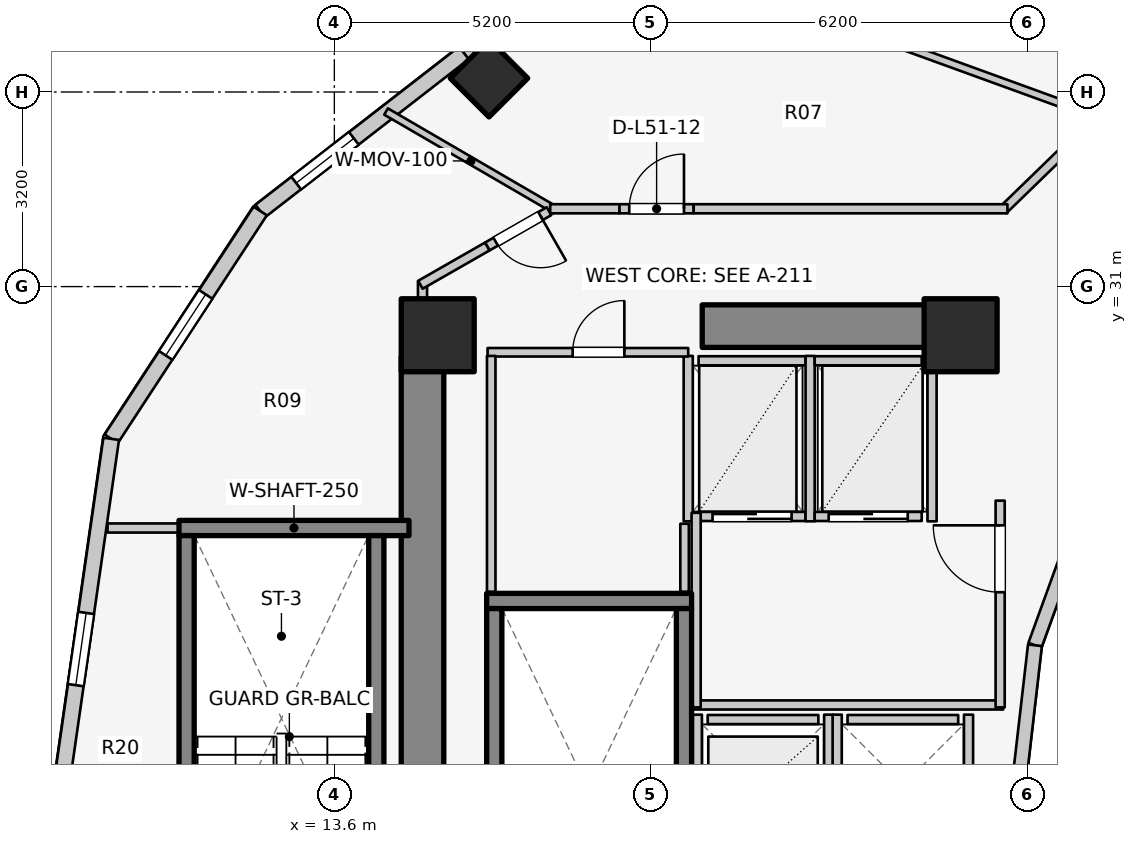
"""IFC4 building model, lengths in metres.
Left out: names, types, materials, properties, quantities, classifications, styles, units other than length and angle.
Written with IfcOpenShell. Run it as: python <this file> out.ifc"""

import sys

from ifc_helpers import new_model, si_unit, direction, frame, frame_2d, origin, origin_2d, place, context, subcontext, project, spatial, rectangle, extrude, element, fill, save


model = new_model("IFC4")
c1 = context("Model", 3, precision=1e-05, world=origin(), true_north=direction((0.0, 1.0)))
c2 = subcontext(c1, "Body", "Model", "MODEL_VIEW")
j1 = project(units=[si_unit("LENGTHUNIT", "METRE"), si_unit("PLANEANGLEUNIT", "RADIAN")], contexts=[c1])
p1 = place(None, origin())
s1 = spatial("IfcSite", under=j1, at=p1, CompositionType="ELEMENT")
p2 = place(p1, origin())
s2 = spatial("IfcBuilding", under=s1, at=p2, CompositionType="ELEMENT")
p3 = place(p2, frame((0.0, 0.0, 168.4)))
s3 = spatial("IfcBuildingStorey", under=s2, at=p3, CompositionType="ELEMENT", Elevation=168.4)
p4 = place(p3, frame((15.05, 17.05, 0.0), z_axis=(0.0, 0.0, 1.0), x_axis=(0.0, 1.0, 0.0)))
e1 = element("IfcWall", 1, at=p4, inside=s3, PredefinedType="SHEAR", context=c2, shape_type="SweptSolid", body=[
    extrude(rectangle(XDim=12.8, YDim=0.7, at=frame_2d((6.4, 0.0))), origin(), (0.0, 0.0, 1.0), 3.1),
])
p5 = place(p3, frame((19.65, 30.35, 0.0), z_axis=(0.0, 0.0, 1.0), x_axis=(1.0, 0.0, 0.0)))
e2 = element("IfcWall", 2, at=p5, inside=s3, PredefinedType="SHEAR", context=c2, shape_type="SweptSolid", body=[
    extrude(rectangle(XDim=4.5, YDim=0.7, at=frame_2d((2.25, 0.0))), origin(), (0.0, 0.0, 1.0), 3.1),
])
p6 = place(p3, frame((16.105, 25.83, 0.0), z_axis=(0.0, 0.0, 1.0), x_axis=(1.0, 0.0, 0.0)))
e3 = element("IfcWall", 3, at=p6, inside=s3, PredefinedType="SOLIDWALL", context=c2, shape_type="SweptSolid", body=[
    extrude(rectangle(XDim=3.37, YDim=0.25, at=frame_2d((1.685, 0.0))), origin(), (0.0, 0.0, 1.0), 3.1),
])
for number, where, z_axis, x_axis in (
    (4, (16.23, 17.895, 0.0), (0.0, 0.0, 1.0), (0.0, 1.0, 0.0)),
    (5, (19.35, 17.895, 0.0), (0.0, 0.0, 1.0), (0.0, 1.0, 0.0)),
):
    element("IfcWall", number, at=place(p3, frame(where, z_axis=z_axis, x_axis=x_axis)), inside=s3, PredefinedType="SOLIDWALL", context=c2, shape_type="SweptSolid", body=[
        extrude(rectangle(XDim=7.81, YDim=0.25, at=frame_2d((3.905, 0.0))), origin(), (0.0, 0.0, 1.0), 3.1),
    ])
p7 = place(p3, frame((11.045, 27.03, 0.0), z_axis=(0.0, 0.0, 1.0), x_axis=(1.0, 0.0, 0.0)))
e6 = element("IfcWall", 6, at=p7, inside=s3, PredefinedType="SOLIDWALL", context=c2, shape_type="SweptSolid", body=[
    extrude(rectangle(XDim=3.782, YDim=0.25, at=frame_2d((1.891, 0.0))), origin(), (0.0, 0.0, 1.0), 3.1),
])
for number, where, z_axis, x_axis in (
    (7, (11.17, 19.095, 0.0), (0.0, 0.0, 1.0), (0.0, 1.0, 0.0)),
    (8, (14.29, 19.095, 0.0), (0.0, 0.0, 1.0), (0.0, 1.0, 0.0)),
):
    element("IfcWall", number, at=place(p3, frame(where, z_axis=z_axis, x_axis=x_axis)), inside=s3, PredefinedType="SOLIDWALL", context=c2, shape_type="SweptSolid", body=[
        extrude(rectangle(XDim=7.81, YDim=0.25, at=frame_2d((3.905, 0.0))), origin(), (0.0, 0.0, 1.0), 3.1),
    ])
for number, where, z_axis, x_axis in (
    (9, (23.9, 30.2, 0.0), (0.0, 0.0, 1.0), (1.0, 0.0, 0.0)),
    (10, (15.3, 30.2, 0.0), (0.0, 0.0, 1.0), (1.0, 0.0, 0.0)),
):
    element("IfcColumn", number, at=place(p3, frame(where, z_axis=z_axis, x_axis=x_axis)), inside=s3, PredefinedType="COLUMN", context=c2, shape_type="SweptSolid", body=[
        extrude(rectangle(XDim=1.2, YDim=1.2, at=origin_2d()), origin(), (0.0, 0.0, 1.0), 3.1),
    ])
p8 = place(p3, frame((16.143, 34.427, 0.0), z_axis=(0.0, 0.0, 1.0), x_axis=(-0.707106781187, 0.707106781187, 0.0)))
e11 = element("IfcColumn", 11, at=p8, inside=s3, PredefinedType="COLUMN", context=c2, shape_type="SweptSolid", body=[
    extrude(rectangle(XDim=0.9, YDim=0.9, at=origin_2d()), origin(), (0.0, 0.0, 1.0), 3.1),
])
p9 = place(p3, frame((25.834, 27.06, 0.0), z_axis=(0.0, 0.0, 1.0), x_axis=(-0.341423187295, -0.93990968033, 0.0)))
e12 = element("IfcWall", 12, at=p9, inside=s3, PredefinedType="STANDARD", context=c2, shape_type="SweptSolid", body=[
    extrude(rectangle(XDim=2.084, YDim=0.23, at=frame_2d((1.042, 0.0))), origin(), (0.0, 0.0, 1.0), 2.56),
])
p10 = place(p3, frame((25.123, 25.102, 0.0), z_axis=(0.0, 0.0, 1.0), x_axis=(-0.114711713601, -0.993398823617, 0.0)))
e13 = element("IfcWall", 13, at=p10, inside=s3, PredefinedType="STANDARD", context=c2, shape_type="SweptSolid", body=[
    extrude(rectangle(XDim=2.115, YDim=0.23, at=frame_2d((1.058, 0.0))), origin(), (0.0, 0.0, 1.0), 2.56),
])
p11 = place(p3, frame((19.587, 36.863, 0.0), z_axis=(0.0, 0.0, 1.0), x_axis=(-0.885660265226, -0.464333818065, 0.0)))
e14 = element("IfcWall", 14, at=p11, inside=s3, PredefinedType="STANDARD", context=c2, shape_type="SweptSolid", body=[
    extrude(rectangle(XDim=4.354, YDim=0.26, at=frame_2d((2.177, 0.0))), origin(), (0.0, 0.0, 1.0), 1.22),
])
p12 = place(p3, frame((15.731, 34.842, 0.0), z_axis=(0.0, 0.0, 1.0), x_axis=(-0.790185650662, -0.612867552973, 0.0)))
e15 = element("IfcWall", 15, at=p12, inside=s3, PredefinedType="STANDARD", context=c2, shape_type="SweptSolid", body=[
    extrude(rectangle(XDim=4.239, YDim=0.26, at=frame_2d((2.12, 0.0))), origin(), (0.0, 0.0, 1.0), 1.22),
])
p13 = place(p12, frame((2.29, 0.0, 0.15)))
e16 = element("IfcOpeningElement", 16, at=p13, cuts=e15, PredefinedType="OPENING", context=c2, shape_type="SweptSolid", body=[
    extrude(rectangle(XDim=1.2, YDim=0.9, at=frame_2d((0.6, 0.45))), frame((0.0, 0.14, 0.0), z_axis=(0.0, -1.0, 0.0), x_axis=(1.0, 0.0, 0.0)), (0.0, 0.0, 1.0), 0.28),
])
p14 = place(p3, frame((12.381, 32.243, 0.0), z_axis=(0.0, 0.0, 1.0), x_axis=(-0.547456494366, -0.836834145322, 0.0)))
e17 = element("IfcWall", 17, at=p14, inside=s3, PredefinedType="STANDARD", context=c2, shape_type="SweptSolid", body=[
    extrude(rectangle(XDim=4.477, YDim=0.26, at=frame_2d((2.239, 0.0))), origin(), (0.0, 0.0, 1.0), 1.22),
])
p15 = place(p14, frame((1.639, 0.0, 0.15)))
e18 = element("IfcOpeningElement", 18, at=p15, cuts=e17, PredefinedType="OPENING", context=c2, shape_type="SweptSolid", body=[
    extrude(rectangle(XDim=1.2, YDim=0.9, at=frame_2d((0.6, 0.45))), frame((0.0, 0.14, 0.0), z_axis=(0.0, -1.0, 0.0), x_axis=(1.0, 0.0, 0.0)), (0.0, 0.0, 1.0), 0.28),
])
p16 = place(p3, frame((9.93, 28.497, 0.0), z_axis=(0.0, 0.0, 1.0), x_axis=(-0.142227632286, -0.989833976288, 0.0)))
e19 = element("IfcWall", 19, at=p16, inside=s3, PredefinedType="STANDARD", context=c2, shape_type="SweptSolid", body=[
    extrude(rectangle(XDim=5.553, YDim=0.26, at=frame_2d((2.776, 0.0))), origin(), (0.0, 0.0, 1.0), 2.57),
])
p17 = place(p16, frame((2.892, 0.0, 0.75)))
e20 = element("IfcOpeningElement", 20, at=p17, cuts=e19, PredefinedType="OPENING", context=c2, shape_type="SweptSolid", body=[
    extrude(rectangle(XDim=1.2, YDim=1.5, at=frame_2d((0.6, 0.75))), frame((0.0, 0.14, 0.0), z_axis=(0.0, -1.0, 0.0), x_axis=(1.0, 0.0, 0.0)), (0.0, 0.0, 1.0), 0.28),
])
p18 = place(p3, frame((19.74, 23.88, 0.0), z_axis=(0.0, 0.0, 1.0), x_axis=(1.0, 0.0, 0.0)))
e21 = element("IfcWall", 21, at=p18, inside=s3, PredefinedType="SOLIDWALL", context=c2, shape_type="SweptSolid", body=[
    extrude(rectangle(XDim=1.82, YDim=0.15, at=frame_2d((0.91, 0.0))), origin(), (0.0, 0.0, 1.0), 2.575),
])
for number, where, z_axis, x_axis in (
    (22, (19.57, 21.64, 0.0), (0.0, 0.0, 1.0), (0.0, 1.0, 0.0)),
    (23, (21.73, 21.64, 0.0), (0.0, 0.0, 1.0), (0.0, 1.0, 0.0)),
):
    element("IfcWall", number, at=place(p3, frame(where, z_axis=z_axis, x_axis=x_axis)), inside=s3, PredefinedType="SOLIDWALL", context=c2, shape_type="SweptSolid", body=[
        extrude(rectangle(XDim=2.32, YDim=0.15, at=frame_2d((1.16, 0.0))), origin(), (0.0, 0.0, 1.0), 2.575),
    ])
p19 = place(p3, frame((22.04, 23.88, 0.0), z_axis=(0.0, 0.0, 1.0), x_axis=(1.0, 0.0, 0.0)))
e24 = element("IfcWall", 24, at=p19, inside=s3, PredefinedType="SOLIDWALL", context=c2, shape_type="SweptSolid", body=[
    extrude(rectangle(XDim=1.82, YDim=0.15, at=frame_2d((0.91, 0.0))), origin(), (0.0, 0.0, 1.0), 2.12),
])
p20 = place(p3, frame((21.87, 21.64, 0.0), z_axis=(0.0, 0.0, 1.0), x_axis=(0.0, 1.0, 0.0)))
e25 = element("IfcWall", 25, at=p20, inside=s3, PredefinedType="SOLIDWALL", context=c2, shape_type="SweptSolid", body=[
    extrude(rectangle(XDim=2.32, YDim=0.15, at=frame_2d((1.16, 0.0))), origin(), (0.0, 0.0, 1.0), 2.575),
])
p21 = place(p3, frame((24.03, 21.64, 0.0), z_axis=(0.0, 0.0, 1.0), x_axis=(0.0, 1.0, 0.0)))
e26 = element("IfcWall", 26, at=p21, inside=s3, PredefinedType="SOLIDWALL", context=c2, shape_type="SweptSolid", body=[
    extrude(rectangle(XDim=2.32, YDim=0.15, at=frame_2d((1.16, 0.0))), origin(), (0.0, 0.0, 1.0), 2.12),
])
p22 = place(p3, frame((19.59, 27.22, 0.0), z_axis=(0.0, 0.0, 1.0), x_axis=(1.0, 0.0, 0.0)))
e27 = element("IfcWall", 27, at=p22, inside=s3, PredefinedType="SOLIDWALL", context=c2, shape_type="SweptSolid", body=[
    extrude(rectangle(XDim=1.76, YDim=0.15, at=frame_2d((0.88, 0.0))), origin(), (0.0, 0.0, 1.0), 2.575),
])
p23 = place(p22, frame((0.23, 0.0, 0.0)))
e28 = element("IfcOpeningElement", 28, at=p23, cuts=e27, PredefinedType="OPENING", context=c2, shape_type="SweptSolid", body=[
    extrude(rectangle(XDim=1.3, YDim=2.1, at=frame_2d((0.65, 1.05))), frame((0.0, 0.085, 0.0), z_axis=(0.0, -1.0, 0.0), x_axis=(1.0, 0.0, 0.0)), (0.0, 0.0, 1.0), 0.17),
])
p24 = place(p3, frame((19.59, 29.78, 0.0), z_axis=(0.0, 0.0, 1.0), x_axis=(1.0, 0.0, 0.0)))
e29 = element("IfcWall", 29, at=p24, inside=s3, PredefinedType="SOLIDWALL", context=c2, shape_type="SweptSolid", body=[
    extrude(rectangle(XDim=1.76, YDim=0.15, at=frame_2d((0.88, 0.0))), origin(), (0.0, 0.0, 1.0), 2.575),
])
for number, where, z_axis, x_axis in (
    (30, (19.42, 27.14, 0.0), (0.0, 0.0, 1.0), (0.0, 1.0, 0.0)),
    (31, (21.425, 27.14, 0.0), (0.0, 0.0, 1.0), (0.0, 1.0, 0.0)),
):
    element("IfcWall", number, at=place(p3, frame(where, z_axis=z_axis, x_axis=x_axis)), inside=s3, PredefinedType="SOLIDWALL", context=c2, shape_type="SweptSolid", body=[
        extrude(rectangle(XDim=2.72, YDim=0.15, at=frame_2d((1.36, 0.0))), origin(), (0.0, 0.0, 1.0), 2.575),
    ])
p25 = place(p3, frame((21.5, 27.22, 0.0), z_axis=(0.0, 0.0, 1.0), x_axis=(1.0, 0.0, 0.0)))
e32 = element("IfcWall", 32, at=p25, inside=s3, PredefinedType="SOLIDWALL", context=c2, shape_type="SweptSolid", body=[
    extrude(rectangle(XDim=1.76, YDim=0.15, at=frame_2d((0.88, 0.0))), origin(), (0.0, 0.0, 1.0), 2.575),
])
p26 = place(p25, frame((0.23, 0.0, 0.0)))
e33 = element("IfcOpeningElement", 33, at=p26, cuts=e32, PredefinedType="OPENING", context=c2, shape_type="SweptSolid", body=[
    extrude(rectangle(XDim=1.3, YDim=2.1, at=frame_2d((0.65, 1.05))), frame((0.0, 0.085, 0.0), z_axis=(0.0, -1.0, 0.0), x_axis=(1.0, 0.0, 0.0)), (0.0, 0.0, 1.0), 0.17),
])
p27 = place(p3, frame((21.5, 29.78, 0.0), z_axis=(0.0, 0.0, 1.0), x_axis=(1.0, 0.0, 0.0)))
e34 = element("IfcWall", 34, at=p27, inside=s3, PredefinedType="SOLIDWALL", context=c2, shape_type="SweptSolid", body=[
    extrude(rectangle(XDim=1.76, YDim=0.15, at=frame_2d((0.88, 0.0))), origin(), (0.0, 0.0, 1.0), 2.575),
])
p28 = place(p3, frame((23.43, 27.14, 0.0), z_axis=(0.0, 0.0, 1.0), x_axis=(0.0, 1.0, 0.0)))
e35 = element("IfcWall", 35, at=p28, inside=s3, PredefinedType="SOLIDWALL", context=c2, shape_type="SweptSolid", body=[
    extrude(rectangle(XDim=2.72, YDim=0.15, at=frame_2d((1.36, 0.0))), origin(), (0.0, 0.0, 1.0), 2.575),
])
p29 = place(p3, frame((19.52, 24.12, 0.0), z_axis=(0.0, 0.0, 1.0), x_axis=(1.0, 0.0, 0.0)))
e36 = element("IfcWall", 36, at=p29, inside=s3, PredefinedType="PARTITIONING", context=c2, shape_type="SweptSolid", body=[
    extrude(rectangle(XDim=5.08, YDim=0.15, at=frame_2d((2.54, 0.0))), origin(), (0.0, 0.0, 1.0), 2.12),
])
p30 = place(p3, frame((19.55, 24.08, 0.0), z_axis=(0.0, 0.0, 1.0), x_axis=(0.0, 1.0, 0.0)))
e37 = element("IfcWall", 37, at=p30, inside=s3, PredefinedType="PARTITIONING", context=c2, shape_type="SweptSolid", body=[
    extrude(rectangle(XDim=3.2, YDim=0.15, at=frame_2d((1.6, 0.0))), origin(), (0.0, 0.0, 1.0), 2.575),
])
p31 = place(p3, frame((24.55, 24.08, 0.0), z_axis=(0.0, 0.0, 1.0), x_axis=(0.0, 1.0, 0.0)))
e38 = element("IfcWall", 38, at=p31, inside=s3, PredefinedType="PARTITIONING", context=c2, shape_type="SweptSolid", body=[
    extrude(rectangle(XDim=3.4, YDim=0.15, at=frame_2d((1.7, 0.0))), origin(), (0.0, 0.0, 1.0), 2.575),
])
p32 = place(p31, frame((1.894, 0.0, 0.0)))
e39 = element("IfcOpeningElement", 39, at=p32, cuts=e38, PredefinedType="OPENING", context=c2, shape_type="SweptSolid", body=[
    extrude(rectangle(XDim=1.1, YDim=2.1, at=frame_2d((0.55, 1.05))), frame((0.0, 0.085, 0.0), z_axis=(0.0, -1.0, 0.0), x_axis=(1.0, 0.0, 0.0)), (0.0, 0.0, 1.0), 0.17),
])
p33 = place(p3, frame((16.12, 29.92, 0.0), z_axis=(0.0, 0.0, 1.0), x_axis=(1.0, 0.0, 0.0)))
e40 = element("IfcWall", 40, at=p33, inside=s3, PredefinedType="PLUMBINGWALL", context=c2, shape_type="SweptSolid", body=[
    extrude(rectangle(XDim=3.3, YDim=0.14, at=frame_2d((1.65, 0.0))), origin(), (0.0, 0.0, 1.0), 2.575),
])
p34 = place(p33, frame((1.399, 0.0, 0.0)))
e41 = element("IfcOpeningElement", 41, at=p34, cuts=e40, PredefinedType="OPENING", context=c2, shape_type="SweptSolid", body=[
    extrude(rectangle(XDim=0.85, YDim=2.05, at=frame_2d((0.425, 1.025))), frame((0.0, 0.08, 0.0), z_axis=(0.0, -1.0, 0.0), x_axis=(1.0, 0.0, 0.0)), (0.0, 0.0, 1.0), 0.16),
])
p35 = place(p3, frame((16.18, 25.98, 0.0), z_axis=(0.0, 0.0, 1.0), x_axis=(0.0, 1.0, 0.0)))
e42 = element("IfcWall", 42, at=p35, inside=s3, PredefinedType="PLUMBINGWALL", context=c2, shape_type="SweptSolid", body=[
    extrude(rectangle(XDim=3.88, YDim=0.14, at=frame_2d((1.94, 0.0))), origin(), (0.0, 0.0, 1.0), 2.575),
])
p36 = place(p3, frame((19.36, 25.98, 0.0), z_axis=(0.0, 0.0, 1.0), x_axis=(0.0, 1.0, 0.0)))
e43 = element("IfcWall", 43, at=p36, inside=s3, PredefinedType="PLUMBINGWALL", context=c2, shape_type="SweptSolid", body=[
    extrude(rectangle(XDim=1.12, YDim=0.14, at=frame_2d((0.56, 0.0))), origin(), (0.0, 0.0, 1.0), 2.575),
])
p37 = place(p3, frame((9.87, 27.03, 0.0), z_axis=(0.0, 0.0, 1.0), x_axis=(1.0, 0.0, 0.0)))
e44 = element("IfcWall", 44, at=p37, inside=s3, PredefinedType="PARTITIONING", context=c2, shape_type="SweptSolid", body=[
    extrude(rectangle(XDim=1.17, YDim=0.15, at=frame_2d((0.585, 0.0))), origin(), (0.0, 0.0, 1.0), 2.575),
])
p38 = place(p3, frame((15.05, 29.8, 0.0), z_axis=(0.0, 0.0, 1.0), x_axis=(0.0, 1.0, 0.0)))
e45 = element("IfcWall", 45, at=p38, inside=s3, PredefinedType="PARTITIONING", context=c2, shape_type="SweptSolid", body=[
    extrude(rectangle(XDim=1.29, YDim=0.15, at=frame_2d((0.645, 0.0))), origin(), (0.0, 0.0, 1.0), 1.22),
])
p39 = place(p3, frame((17.243, 32.255, 0.0), z_axis=(0.0, 0.0, 1.0), x_axis=(-0.864408655832, 0.502789892224, 0.0)))
e46 = element("IfcWall", 46, at=p39, inside=s3, PredefinedType="MOVABLE", context=c2, shape_type="SweptSolid", body=[
    extrude(rectangle(XDim=3.23, YDim=0.12, at=frame_2d((1.615, 0.0))), origin(), (0.0, 0.0, 1.0), 1.22),
])
p40 = place(p3, frame((26.133, 33.749, 0.0), z_axis=(0.0, 0.0, 1.0), x_axis=(-0.717419568599, -0.696641344302, 0.0)))
e47 = element("IfcWall", 47, at=p40, inside=s3, PredefinedType="PARTITIONING", context=c2, shape_type="SweptSolid", body=[
    extrude(rectangle(XDim=2.138, YDim=0.15, at=frame_2d((1.069, 0.0))), origin(), (0.0, 0.0, 1.0), 2.019),
])
p41 = place(p3, frame((17.15, 32.28, 0.0), z_axis=(0.0, 0.0, 1.0), x_axis=(1.0, 0.0, 0.0)))
e48 = element("IfcWall", 48, at=p41, inside=s3, PredefinedType="PARTITIONING", context=c2, shape_type="SweptSolid", body=[
    extrude(rectangle(XDim=1.14, YDim=0.15, at=frame_2d((0.57, 0.0))), origin(), (0.0, 0.0, 1.0), 2.575),
])
p42 = place(p3, frame((18.29, 32.28, 0.0), z_axis=(0.0, 0.0, 1.0), x_axis=(1.0, 0.0, 0.0)))
e49 = element("IfcWall", 49, at=p42, inside=s3, PredefinedType="PARTITIONING", context=c2, shape_type="SweptSolid", body=[
    extrude(rectangle(XDim=1.22, YDim=0.15, at=frame_2d((0.61, 0.0))), origin(), (0.0, 0.0, 1.0), 2.575),
])
p43 = place(p42, frame((0.16, 0.0, 0.0)))
e50 = element("IfcOpeningElement", 50, at=p43, cuts=e49, PredefinedType="OPENING", context=c2, shape_type="SweptSolid", body=[
    extrude(rectangle(XDim=0.9, YDim=2.1, at=frame_2d((0.45, 1.05))), frame((0.0, 0.085, 0.0), z_axis=(0.0, -1.0, 0.0), x_axis=(1.0, 0.0, 0.0)), (0.0, 0.0, 1.0), 0.17),
])
p44 = place(p3, frame((19.51, 32.28, 0.0), z_axis=(0.0, 0.0, 1.0), x_axis=(1.0, 0.0, 0.0)))
e51 = element("IfcWall", 51, at=p44, inside=s3, PredefinedType="PARTITIONING", context=c2, shape_type="SweptSolid", body=[
    extrude(rectangle(XDim=5.16, YDim=0.15, at=frame_2d((2.58, 0.0))), origin(), (0.0, 0.0, 1.0), 2.019),
])
p45 = place(p3, frame((17.13, 32.24, 0.0), z_axis=(0.0, 0.0, 1.0), x_axis=(-0.867934757977, -0.496678221684, 0.0)))
e52 = element("IfcWall", 52, at=p45, inside=s3, PredefinedType="PARTITIONING", context=c2, shape_type="SweptSolid", body=[
    extrude(rectangle(XDim=1.17, YDim=0.15, at=frame_2d((0.585, 0.0))), origin(), (0.0, 0.0, 1.0), 2.11),
])
p46 = place(p45, frame((0.16, 0.0, 0.0)))
e53 = element("IfcOpeningElement", 53, at=p46, cuts=e52, PredefinedType="OPENING", context=c2, shape_type="SweptSolid", body=[
    extrude(rectangle(XDim=0.85, YDim=2.05, at=frame_2d((0.425, 1.025))), frame((0.0, 0.085, 0.0), z_axis=(0.0, -1.0, 0.0), x_axis=(1.0, 0.0, 0.0)), (0.0, 0.0, 1.0), 0.17),
])
p47 = place(p3, frame((16.115, 31.659, 0.0), z_axis=(0.0, 0.0, 1.0), x_axis=(-0.868005797727, -0.496554060614, 0.0)))
e54 = element("IfcWall", 54, at=p47, inside=s3, PredefinedType="PARTITIONING", context=c2, shape_type="SweptSolid", body=[
    extrude(rectangle(XDim=1.267, YDim=0.15, at=frame_2d((0.633, 0.0))), origin(), (0.0, 0.0, 1.0), 1.22),
])
p48 = place(p3, frame((26.12, 33.806, 0.0), z_axis=(0.0, 0.0, 1.0), x_axis=(-0.939901628116, 0.341445353557, 0.0)))
e55 = element("IfcWall", 55, at=p48, inside=s3, PredefinedType="PARTITIONING", context=c2, shape_type="SweptSolid", body=[
    extrude(rectangle(XDim=6.387, YDim=0.125, at=frame_2d((3.194, 0.0))), origin(), (0.0, 0.0, 1.0), 1.22),
])
p49 = place(p13, origin())
e56 = element("IfcWindow", 56, at=p49, inside=s3, PartitioningType="SINGLE_PANEL", PredefinedType="WINDOW", context=c2, shape_type="SweptSolid", body=[
    extrude(rectangle(XDim=1.2, YDim=0.9, at=frame_2d((0.6, 0.45))), frame((0.0, 0.03, 0.0), z_axis=(0.0, -1.0, 0.0), x_axis=(1.0, 0.0, 0.0)), (0.0, 0.0, 1.0), 0.06),
])
fill(e16, e56)
p50 = place(p15, origin())
e57 = element("IfcWindow", 57, at=p50, inside=s3, PartitioningType="SINGLE_PANEL", PredefinedType="WINDOW", context=c2, shape_type="SweptSolid", body=[
    extrude(rectangle(XDim=1.2, YDim=0.9, at=frame_2d((0.6, 0.45))), frame((0.0, 0.03, 0.0), z_axis=(0.0, -1.0, 0.0), x_axis=(1.0, 0.0, 0.0)), (0.0, 0.0, 1.0), 0.06),
])
fill(e18, e57)
p51 = place(p17, origin())
e58 = element("IfcWindow", 58, at=p51, inside=s3, PartitioningType="SINGLE_PANEL", PredefinedType="WINDOW", context=c2, shape_type="SweptSolid", body=[
    extrude(rectangle(XDim=1.2, YDim=1.5, at=frame_2d((0.6, 0.75))), frame((0.0, 0.03, 0.0), z_axis=(0.0, -1.0, 0.0), x_axis=(1.0, 0.0, 0.0)), (0.0, 0.0, 1.0), 0.06),
])
fill(e20, e58)
p52 = place(p23, origin())
e59 = element("IfcDoor", 59, at=p52, inside=s3, OperationType="DOUBLE_DOOR_SLIDING", PredefinedType="DOOR", context=c2, shape_type="SweptSolid", body=[
    extrude(rectangle(XDim=1.3, YDim=2.1, at=frame_2d((0.65, 1.05))), frame((0.0, 0.025, 0.0), z_axis=(0.0, -1.0, 0.0), x_axis=(1.0, 0.0, 0.0)), (0.0, 0.0, 1.0), 0.05),
])
fill(e28, e59)
p53 = place(p26, origin())
e60 = element("IfcDoor", 60, at=p53, inside=s3, OperationType="DOUBLE_DOOR_SLIDING", PredefinedType="DOOR", context=c2, shape_type="SweptSolid", body=[
    extrude(rectangle(XDim=1.3, YDim=2.1, at=frame_2d((0.65, 1.05))), frame((0.0, 0.025, 0.0), z_axis=(0.0, -1.0, 0.0), x_axis=(1.0, 0.0, 0.0)), (0.0, 0.0, 1.0), 0.05),
])
fill(e33, e60)
p54 = place(p32, origin())
e61 = element("IfcDoor", 61, at=p54, inside=s3, OperationType="SINGLE_SWING_RIGHT", PredefinedType="DOOR", context=c2, shape_type="SweptSolid", body=[
    extrude(rectangle(XDim=1.1, YDim=2.1, at=frame_2d((0.55, 1.05))), frame((0.0, 0.025, 0.0), z_axis=(0.0, -1.0, 0.0), x_axis=(1.0, 0.0, 0.0)), (0.0, 0.0, 1.0), 0.05),
])
fill(e39, e61)
p55 = place(p34, origin())
e62 = element("IfcDoor", 62, at=p55, inside=s3, OperationType="SINGLE_SWING_RIGHT", PredefinedType="DOOR", context=c2, shape_type="SweptSolid", body=[
    extrude(rectangle(XDim=0.85, YDim=2.05, at=frame_2d((0.425, 1.025))), frame((0.0, 0.025, 0.0), z_axis=(0.0, -1.0, 0.0), x_axis=(1.0, 0.0, 0.0)), (0.0, 0.0, 1.0), 0.05),
])
fill(e41, e62)
p56 = place(p43, origin())
e63 = element("IfcDoor", 63, at=p56, inside=s3, OperationType="SINGLE_SWING_RIGHT", PredefinedType="DOOR", context=c2, shape_type="SweptSolid", body=[
    extrude(rectangle(XDim=0.9, YDim=2.1, at=frame_2d((0.45, 1.05))), frame((0.0, 0.025, 0.0), z_axis=(0.0, -1.0, 0.0), x_axis=(1.0, 0.0, 0.0)), (0.0, 0.0, 1.0), 0.05),
])
fill(e50, e63)
p57 = place(p46, origin())
e64 = element("IfcDoor", 64, at=p57, inside=s3, OperationType="SINGLE_SWING_LEFT", PredefinedType="DOOR", context=c2, shape_type="SweptSolid", body=[
    extrude(rectangle(XDim=0.85, YDim=2.05, at=frame_2d((0.425, 1.025))), frame((0.0, 0.025, 0.0), z_axis=(0.0, -1.0, 0.0), x_axis=(1.0, 0.0, 0.0)), (0.0, 0.0, 1.0), 0.05),
])
fill(e53, e64)
save(model, sys.argv[1])
